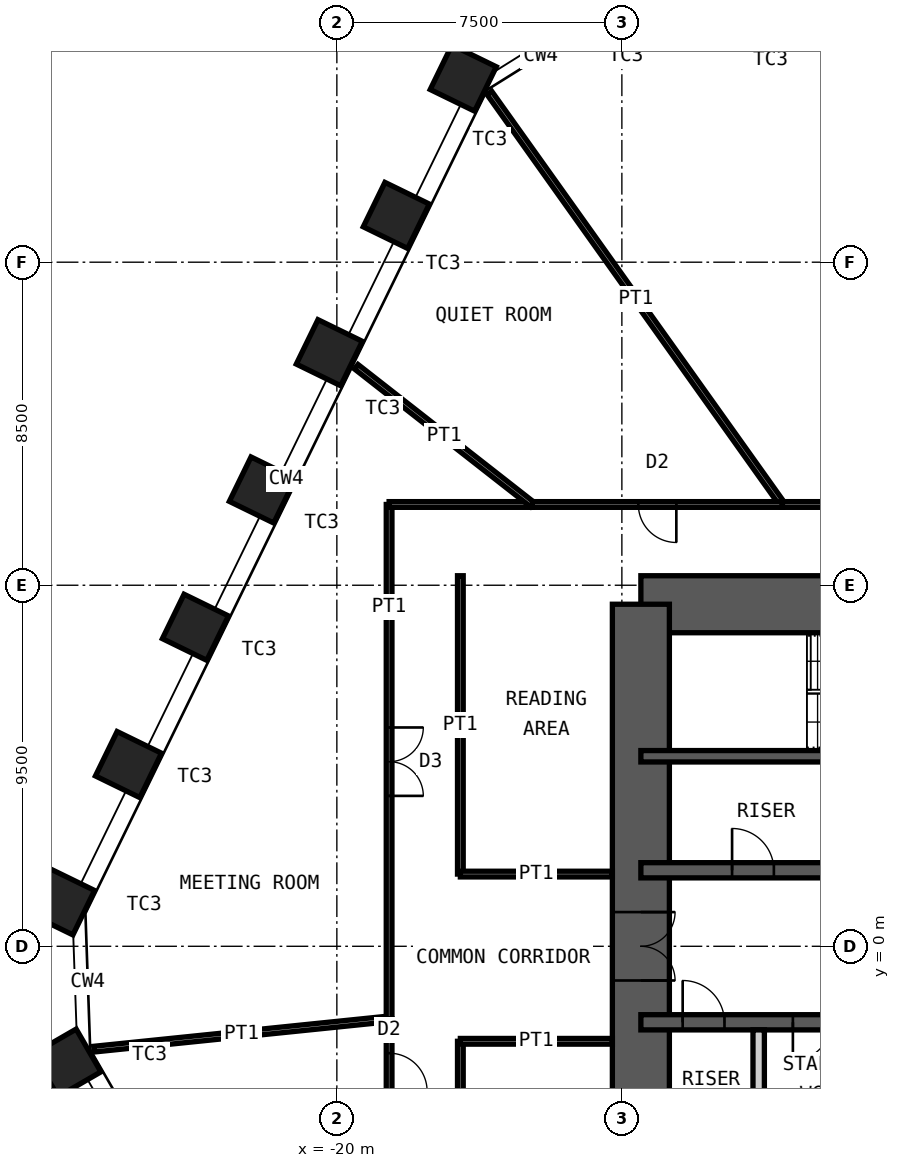
"""IFC4 building model, lengths in metres.
Left out: names, types, materials, properties, quantities, classifications, styles, units other than length and angle.
Written with IfcOpenShell. Run it as: python <this file> out.ifc"""

import sys

from ifc_helpers import new_model, si_unit, direction, frame, frame_2d, origin, origin_2d, place, context, subcontext, project, spatial, rectangle, hollow_rectangle, extrude, element, fill, save


model = new_model("IFC4")
c1 = context("Model", 3, precision=1e-05, world=origin(), true_north=direction((0.0, 1.0)))
c2 = subcontext(c1, "Body", "Model", "MODEL_VIEW")
j1 = project(units=[si_unit("LENGTHUNIT", "METRE"), si_unit("PLANEANGLEUNIT", "RADIAN")], contexts=[c1])
p1 = place(None, origin())
s1 = spatial("IfcSite", under=j1, at=p1, CompositionType="ELEMENT")
p2 = place(p1, origin())
s2 = spatial("IfcBuilding", under=s1, at=p2, CompositionType="ELEMENT")
p3 = place(p2, frame((0.0, 0.0, 119.8)))
s3 = spatial("IfcBuildingStorey", under=s2, at=p3, CompositionType="ELEMENT", Elevation=119.8)
for number, where, z_axis, x_axis in (
    (1, (-27.097, -3.067, 0.0), (0.0, 0.0, 1.0), (0.5, -0.866, 0.0)),
    (2, (-27.245, 1.169, 0.0), (0.0, 0.0, 1.0), (-0.438, -0.899, 0.0)),
    (3, (-25.483, 4.781, 0.0), (0.0, 0.0, 1.0), (-0.438, -0.899, 0.0)),
    (4, (-23.721, 8.394, 0.0), (0.0, 0.0, 1.0), (-0.438, -0.899, 0.0)),
    (5, (-21.959, 12.006, 0.0), (0.0, 0.0, 1.0), (-0.438, -0.899, 0.0)),
    (6, (-20.198, 15.618, 0.0), (0.0, 0.0, 1.0), (-0.438, -0.899, 0.0)),
    (7, (-18.436, 19.23, 0.0), (0.0, 0.0, 1.0), (-0.438, -0.899, 0.0)),
    (8, (-16.674, 22.843, 0.0), (0.0, 0.0, 1.0), (-0.438, -0.899, 0.0)),
):
    element("IfcColumn", number, at=place(p3, frame(where, z_axis=z_axis, x_axis=x_axis)), inside=s3, PredefinedType="COLUMN", context=c2, shape_type="SweptSolid", body=[
        extrude(hollow_rectangle(XDim=1.3, YDim=1.3, WallThickness=0.1, at=origin_2d()), origin(), (0.0, 0.0, 1.0), 4.2),
    ])
p4 = place(p3, frame((-12.0, 9.0, 0.0), z_axis=(0.0, 0.0, 1.0), x_axis=(1.0, 0.0, 0.0)))
e9 = element("IfcWall", 9, at=p4, inside=s3, PredefinedType="SHEAR", context=c2, shape_type="SweptSolid", body=[
    extrude(rectangle(XDim=24.0, YDim=1.5, at=frame_2d((12.0, 0.0))), origin(), (0.0, 0.0, 1.0), 4.2),
])
p5 = place(p4, frame((10.4, 0.0, 0.0)))
e10 = element("IfcOpeningElement", 10, at=p5, cuts=e9, PredefinedType="OPENING", context=c2, shape_type="SweptSolid", body=[
    extrude(rectangle(XDim=1.0, YDim=2.1, at=frame_2d((0.5, 1.05))), frame((0.0, 0.76, 0.0), z_axis=(0.0, -1.0, 0.0), x_axis=(1.0, 0.0, 0.0)), (0.0, 0.0, 1.0), 1.52),
])
p6 = place(p4, frame((17.6, 0.0, 0.0)))
e11 = element("IfcOpeningElement", 11, at=p6, cuts=e9, PredefinedType="OPENING", context=c2, shape_type="SweptSolid", body=[
    extrude(rectangle(XDim=0.9, YDim=2.1, at=frame_2d((0.45, 1.05))), frame((0.0, 0.76, 0.0), z_axis=(0.0, -1.0, 0.0), x_axis=(1.0, 0.0, 0.0)), (0.0, 0.0, 1.0), 1.52),
])
p7 = place(p4, frame((21.9, 0.0, 0.0)))
e12 = element("IfcOpeningElement", 12, at=p7, cuts=e9, PredefinedType="OPENING", context=c2, shape_type="SweptSolid", body=[
    extrude(rectangle(XDim=0.9, YDim=2.1, at=frame_2d((0.45, 1.05))), frame((0.0, 0.76, 0.0), z_axis=(0.0, -1.0, 0.0), x_axis=(1.0, 0.0, 0.0)), (0.0, 0.0, 1.0), 1.52),
])
p8 = place(p3, frame((-12.0, -9.0, 0.0), z_axis=(0.0, 0.0, 1.0), x_axis=(0.0, 1.0, 0.0)))
e13 = element("IfcWall", 13, at=p8, inside=s3, PredefinedType="SHEAR", context=c2, shape_type="SweptSolid", body=[
    extrude(rectangle(XDim=18.0, YDim=1.5, at=frame_2d((9.0, 0.0))), origin(), (0.0, 0.0, 1.0), 4.2),
])
p9 = place(p8, frame((8.1, 0.0, 0.0)))
e14 = element("IfcOpeningElement", 14, at=p9, cuts=e13, PredefinedType="OPENING", context=c2, shape_type="SweptSolid", body=[
    extrude(rectangle(XDim=1.8, YDim=2.1, at=frame_2d((0.9, 1.05))), frame((0.0, 0.76, 0.0), z_axis=(0.0, -1.0, 0.0), x_axis=(1.0, 0.0, 0.0)), (0.0, 0.0, 1.0), 1.52),
])
p10 = place(p3, frame((-12.0, 5.0, 0.0), z_axis=(0.0, 0.0, 1.0), x_axis=(1.0, 0.0, 0.0)))
e15 = element("IfcWall", 15, at=p10, inside=s3, PredefinedType="SHEAR", context=c2, shape_type="SweptSolid", body=[
    extrude(rectangle(XDim=24.0, YDim=0.3, at=frame_2d((12.0, 0.0))), origin(), (0.0, 0.0, 1.0), 4.2),
])
p11 = place(p3, frame((-12.0, 2.0, 0.0), z_axis=(0.0, 0.0, 1.0), x_axis=(1.0, 0.0, 0.0)))
e16 = element("IfcWall", 16, at=p11, inside=s3, PredefinedType="SHEAR", context=c2, shape_type="SweptSolid", body=[
    extrude(rectangle(XDim=24.0, YDim=0.4, at=frame_2d((12.0, 0.0))), origin(), (0.0, 0.0, 1.0), 4.2),
])
p12 = place(p11, frame((2.4, 0.0, 0.0)))
e17 = element("IfcOpeningElement", 17, at=p12, cuts=e16, PredefinedType="OPENING", context=c2, shape_type="SweptSolid", body=[
    extrude(rectangle(XDim=1.1, YDim=2.1, at=frame_2d((0.55, 1.05))), frame((0.0, 0.21, 0.0), z_axis=(0.0, -1.0, 0.0), x_axis=(1.0, 0.0, 0.0)), (0.0, 0.0, 1.0), 0.42),
])
p13 = place(p11, frame((22.0, 0.0, 0.0)))
e18 = element("IfcOpeningElement", 18, at=p13, cuts=e16, PredefinedType="OPENING", context=c2, shape_type="SweptSolid", body=[
    extrude(rectangle(XDim=1.1, YDim=2.1, at=frame_2d((0.55, 1.05))), frame((0.0, 0.21, 0.0), z_axis=(0.0, -1.0, 0.0), x_axis=(1.0, 0.0, 0.0)), (0.0, 0.0, 1.0), 0.42),
])
p14 = place(p11, frame((10.15, 0.0, 0.0)))
e19 = element("IfcOpeningElement", 19, at=p14, cuts=e16, PredefinedType="OPENING", context=c2, shape_type="SweptSolid", body=[
    extrude(rectangle(XDim=1.0, YDim=2.1, at=frame_2d((0.5, 1.05))), frame((0.0, 0.21, 0.0), z_axis=(0.0, -1.0, 0.0), x_axis=(1.0, 0.0, 0.0)), (0.0, 0.0, 1.0), 0.42),
])
p15 = place(p11, frame((6.9, 0.0, 0.0)))
e20 = element("IfcOpeningElement", 20, at=p15, cuts=e16, PredefinedType="OPENING", context=c2, shape_type="SweptSolid", body=[
    extrude(rectangle(XDim=1.0, YDim=2.1, at=frame_2d((0.5, 1.05))), frame((0.0, 0.21, 0.0), z_axis=(0.0, -1.0, 0.0), x_axis=(1.0, 0.0, 0.0)), (0.0, 0.0, 1.0), 0.42),
])
p16 = place(p11, frame((13.35, 0.0, 0.0)))
e21 = element("IfcOpeningElement", 21, at=p16, cuts=e16, PredefinedType="OPENING", context=c2, shape_type="SweptSolid", body=[
    extrude(rectangle(XDim=1.1, YDim=2.4, at=frame_2d((0.55, 1.2))), frame((0.0, 0.21, 0.0), z_axis=(0.0, -1.0, 0.0), x_axis=(1.0, 0.0, 0.0)), (0.0, 0.0, 1.0), 0.42),
])
p17 = place(p11, frame((16.15, 0.0, 0.0)))
e22 = element("IfcOpeningElement", 22, at=p17, cuts=e16, PredefinedType="OPENING", context=c2, shape_type="SweptSolid", body=[
    extrude(rectangle(XDim=1.1, YDim=2.4, at=frame_2d((0.55, 1.2))), frame((0.0, 0.21, 0.0), z_axis=(0.0, -1.0, 0.0), x_axis=(1.0, 0.0, 0.0)), (0.0, 0.0, 1.0), 0.42),
])
p18 = place(p11, frame((18.95, 0.0, 0.0)))
e23 = element("IfcOpeningElement", 23, at=p18, cuts=e16, PredefinedType="OPENING", context=c2, shape_type="SweptSolid", body=[
    extrude(rectangle(XDim=1.1, YDim=2.4, at=frame_2d((0.55, 1.2))), frame((0.0, 0.21, 0.0), z_axis=(0.0, -1.0, 0.0), x_axis=(1.0, 0.0, 0.0)), (0.0, 0.0, 1.0), 0.42),
])
p19 = place(p3, frame((-12.0, -2.0, 0.0), z_axis=(0.0, 0.0, 1.0), x_axis=(1.0, 0.0, 0.0)))
e24 = element("IfcWall", 24, at=p19, inside=s3, PredefinedType="SHEAR", context=c2, shape_type="SweptSolid", body=[
    extrude(rectangle(XDim=24.0, YDim=0.4, at=frame_2d((12.0, 0.0))), origin(), (0.0, 0.0, 1.0), 4.2),
])
p20 = place(p19, frame((1.1, 0.0, 0.0)))
e25 = element("IfcOpeningElement", 25, at=p20, cuts=e24, PredefinedType="OPENING", context=c2, shape_type="SweptSolid", body=[
    extrude(rectangle(XDim=1.1, YDim=2.1, at=frame_2d((0.55, 1.05))), frame((0.0, 0.21, 0.0), z_axis=(0.0, -1.0, 0.0), x_axis=(1.0, 0.0, 0.0)), (0.0, 0.0, 1.0), 0.42),
])
p21 = place(p19, frame((13.55, 0.0, 0.0)))
e26 = element("IfcOpeningElement", 26, at=p21, cuts=e24, PredefinedType="OPENING", context=c2, shape_type="SweptSolid", body=[
    extrude(rectangle(XDim=1.1, YDim=2.1, at=frame_2d((0.55, 1.05))), frame((0.0, 0.21, 0.0), z_axis=(0.0, -1.0, 0.0), x_axis=(1.0, 0.0, 0.0)), (0.0, 0.0, 1.0), 0.42),
])
p22 = place(p19, frame((20.7, 0.0, 0.0)))
e27 = element("IfcOpeningElement", 27, at=p22, cuts=e24, PredefinedType="OPENING", context=c2, shape_type="SweptSolid", body=[
    extrude(rectangle(XDim=1.1, YDim=2.1, at=frame_2d((0.55, 1.05))), frame((0.0, 0.21, 0.0), z_axis=(0.0, -1.0, 0.0), x_axis=(1.0, 0.0, 0.0)), (0.0, 0.0, 1.0), 0.42),
])
p23 = place(p19, frame((4.0, 0.0, 0.0)))
e28 = element("IfcOpeningElement", 28, at=p23, cuts=e24, PredefinedType="OPENING", context=c2, shape_type="SweptSolid", body=[
    extrude(rectangle(XDim=1.0, YDim=2.1, at=frame_2d((0.5, 1.05))), frame((0.0, 0.21, 0.0), z_axis=(0.0, -1.0, 0.0), x_axis=(1.0, 0.0, 0.0)), (0.0, 0.0, 1.0), 0.42),
])
p24 = place(p3, frame((-8.9, -4.85, 0.0), z_axis=(0.0, 0.0, 1.0), x_axis=(0.0, 1.0, 0.0)))
e29 = element("IfcWall", 29, at=p24, inside=s3, PredefinedType="PARTITIONING", context=c2, shape_type="SweptSolid", body=[
    extrude(rectangle(XDim=2.65, YDim=0.3, at=frame_2d((1.325, 0.0))), origin(), (0.0, 0.0, 1.0), 3.98),
])
p25 = place(p3, frame((-15.987, 22.455, 0.0), z_axis=(0.0, 0.0, 1.0), x_axis=(0.579969304452, -0.814638328274, 0.0)))
e30 = element("IfcWall", 30, at=p25, inside=s3, PredefinedType="PARTITIONING", context=c2, shape_type="SweptSolid", body=[
    extrude(rectangle(XDim=13.294, YDim=0.15, at=frame_2d((6.647, 0.0))), origin(), (0.0, 0.0, 1.0), 2.93),
])
p26 = place(p3, frame((-8.277, 11.625, 0.0), z_axis=(0.0, 0.0, 1.0), x_axis=(1.0, 0.0, 0.0)))
e31 = element("IfcWall", 31, at=p26, inside=s3, PredefinedType="PARTITIONING", context=c2, shape_type="SweptSolid", body=[
    extrude(rectangle(XDim=13.488, YDim=0.15, at=frame_2d((6.744, 0.0))), origin(), (0.0, 0.0, 1.0), 4.03),
])
p27 = place(p26, frame((5.844, 0.0, 0.0)))
e32 = element("IfcOpeningElement", 32, at=p27, cuts=e31, PredefinedType="OPENING", context=c2, shape_type="SweptSolid", body=[
    extrude(rectangle(XDim=1.8, YDim=2.4, at=frame_2d((0.9, 1.2))), frame((0.0, 0.085, 0.0), z_axis=(0.0, -1.0, 0.0), x_axis=(1.0, 0.0, 0.0)), (0.0, 0.0, 1.0), 0.17),
])
p28 = place(p3, frame((-18.625, -4.715, 0.0), z_axis=(0.0, 0.0, 1.0), x_axis=(0.0, 1.0, 0.0)))
e33 = element("IfcWall", 33, at=p28, inside=s3, PredefinedType="PARTITIONING", context=c2, shape_type="SweptSolid", body=[
    extrude(rectangle(XDim=2.805, YDim=0.15, at=frame_2d((1.402, 0.0))), origin(), (0.0, 0.0, 1.0), 4.03),
])
p29 = place(p28, frame((0.902, 0.0, 0.0)))
e34 = element("IfcOpeningElement", 34, at=p29, cuts=e33, PredefinedType="OPENING", context=c2, shape_type="SweptSolid", body=[
    extrude(rectangle(XDim=1.0, YDim=2.4, at=frame_2d((0.5, 1.2))), frame((0.0, 0.085, 0.0), z_axis=(0.0, -1.0, 0.0), x_axis=(1.0, 0.0, 0.0)), (0.0, 0.0, 1.0), 0.17),
])
p30 = place(p3, frame((-26.391, -2.706, 0.0), z_axis=(0.0, 0.0, 1.0), x_axis=(0.994783554373, 0.10200823471, 0.0)))
e35 = element("IfcWall", 35, at=p30, inside=s3, PredefinedType="PARTITIONING", context=c2, shape_type="SweptSolid", body=[
    extrude(rectangle(XDim=7.807, YDim=0.15, at=frame_2d((3.904, 0.0))), origin(), (0.0, 0.0, 1.0), 2.93),
])
p31 = place(p3, frame((-18.625, -1.91, 0.0), z_axis=(0.0, 0.0, 1.0), x_axis=(0.0, 1.0, 0.0)))
e36 = element("IfcWall", 36, at=p31, inside=s3, PredefinedType="PARTITIONING", context=c2, shape_type="SweptSolid", body=[
    extrude(rectangle(XDim=13.535, YDim=0.15, at=frame_2d((6.768, 0.0))), origin(), (0.0, 0.0, 1.0), 4.03),
])
p32 = place(p31, frame((5.867, 0.0, 0.0)))
e37 = element("IfcOpeningElement", 37, at=p32, cuts=e36, PredefinedType="OPENING", context=c2, shape_type="SweptSolid", body=[
    extrude(rectangle(XDim=1.8, YDim=2.4, at=frame_2d((0.9, 1.2))), frame((0.0, 0.085, 0.0), z_axis=(0.0, -1.0, 0.0), x_axis=(1.0, 0.0, 0.0)), (0.0, 0.0, 1.0), 0.17),
])
p33 = place(p3, frame((-18.625, 11.625, 0.0), z_axis=(0.0, 0.0, 1.0), x_axis=(1.0, 0.0, 0.0)))
e38 = element("IfcWall", 38, at=p33, inside=s3, PredefinedType="PARTITIONING", context=c2, shape_type="SweptSolid", body=[
    extrude(rectangle(XDim=3.768, YDim=0.15, at=frame_2d((1.884, 0.0))), origin(), (0.0, 0.0, 1.0), 4.03),
])
p34 = place(p3, frame((-19.49, 15.25, 0.0), z_axis=(0.0, 0.0, 1.0), x_axis=(0.787549668605, -0.616251182133, 0.0)))
e39 = element("IfcWall", 39, at=p34, inside=s3, PredefinedType="PARTITIONING", context=c2, shape_type="SweptSolid", body=[
    extrude(rectangle(XDim=5.882, YDim=0.15, at=frame_2d((2.941, 0.0))), origin(), (0.0, 0.0, 1.0), 3.33),
])
p35 = place(p3, frame((-14.857, 11.625, 0.0), z_axis=(0.0, 0.0, 1.0), x_axis=(1.0, 0.0, 0.0)))
e40 = element("IfcWall", 40, at=p35, inside=s3, PredefinedType="PARTITIONING", context=c2, shape_type="SweptSolid", body=[
    extrude(rectangle(XDim=6.581, YDim=0.15, at=frame_2d((3.29, 0.0))), origin(), (0.0, 0.0, 1.0), 4.03),
])
p36 = place(p35, frame((2.79, 0.0, 0.0)))
e41 = element("IfcOpeningElement", 41, at=p36, cuts=e40, PredefinedType="OPENING", context=c2, shape_type="SweptSolid", body=[
    extrude(rectangle(XDim=1.0, YDim=2.4, at=frame_2d((0.5, 1.2))), frame((0.0, 0.085, 0.0), z_axis=(0.0, -1.0, 0.0), x_axis=(1.0, 0.0, 0.0)), (0.0, 0.0, 1.0), 0.17),
])
p37 = place(p3, frame((-16.75, 1.9, 0.0), z_axis=(0.0, 0.0, 1.0), x_axis=(0.0, 1.0, 0.0)))
e42 = element("IfcWall", 42, at=p37, inside=s3, PredefinedType="PARTITIONING", context=c2, shape_type="SweptSolid", body=[
    extrude(rectangle(XDim=7.85, YDim=0.15, at=frame_2d((3.925, 0.0))), origin(), (0.0, 0.0, 1.0), 4.03),
])
p38 = place(p3, frame((-12.75, 1.9, 0.0), z_axis=(0.0, 0.0, 1.0), x_axis=(-1.0, 0.0, 0.0)))
e43 = element("IfcWall", 43, at=p38, inside=s3, PredefinedType="PARTITIONING", context=c2, shape_type="SweptSolid", body=[
    extrude(rectangle(XDim=4.0, YDim=0.15, at=frame_2d((2.0, 0.0))), origin(), (0.0, 0.0, 1.0), 3.33),
])
p39 = place(p3, frame((-16.75, -9.75, 0.0), z_axis=(0.0, 0.0, 1.0), x_axis=(0.0, 1.0, 0.0)))
e44 = element("IfcWall", 44, at=p39, inside=s3, PredefinedType="PARTITIONING", context=c2, shape_type="SweptSolid", body=[
    extrude(rectangle(XDim=7.25, YDim=0.15, at=frame_2d((3.625, 0.0))), origin(), (0.0, 0.0, 1.0), 4.03),
])
p40 = place(p3, frame((-12.75, -2.5, 0.0), z_axis=(0.0, 0.0, 1.0), x_axis=(-1.0, 0.0, 0.0)))
e45 = element("IfcWall", 45, at=p40, inside=s3, PredefinedType="PARTITIONING", context=c2, shape_type="SweptSolid", body=[
    extrude(rectangle(XDim=4.0, YDim=0.15, at=frame_2d((2.0, 0.0))), origin(), (0.0, 0.0, 1.0), 3.33),
])
p41 = place(p12, origin())
e46 = element("IfcDoor", 46, at=p41, inside=s3, OperationType="SINGLE_SWING_RIGHT", PredefinedType="DOOR", context=c2, shape_type="SweptSolid", body=[
    extrude(rectangle(XDim=1.1, YDim=2.1, at=frame_2d((0.55, 1.05))), frame((0.0, 0.025, 0.0), z_axis=(0.0, -1.0, 0.0), x_axis=(1.0, 0.0, 0.0)), (0.0, 0.0, 1.0), 0.05),
])
fill(e17, e46)
p42 = place(p20, origin())
e47 = element("IfcDoor", 47, at=p42, inside=s3, OperationType="SINGLE_SWING_RIGHT", PredefinedType="DOOR", context=c2, shape_type="SweptSolid", body=[
    extrude(rectangle(XDim=1.1, YDim=2.1, at=frame_2d((0.55, 1.05))), frame((0.0, 0.025, 0.0), z_axis=(0.0, -1.0, 0.0), x_axis=(1.0, 0.0, 0.0)), (0.0, 0.0, 1.0), 0.05),
])
fill(e25, e47)
p43 = place(p9, origin())
e48 = element("IfcDoor", 48, at=p43, inside=s3, OperationType="DOUBLE_DOOR_DOUBLE_SWING", PredefinedType="DOOR", context=c2, shape_type="SweptSolid", body=[
    extrude(rectangle(XDim=1.8, YDim=2.1, at=frame_2d((0.9, 1.05))), frame((0.0, 0.025, 0.0), z_axis=(0.0, -1.0, 0.0), x_axis=(1.0, 0.0, 0.0)), (0.0, 0.0, 1.0), 0.05),
])
fill(e14, e48)
p44 = place(p23, origin())
e49 = element("IfcDoor", 49, at=p44, inside=s3, OperationType="SINGLE_SWING_LEFT", PredefinedType="DOOR", context=c2, shape_type="SweptSolid", body=[
    extrude(rectangle(XDim=1.0, YDim=2.1, at=frame_2d((0.5, 1.05))), frame((0.0, 0.025, 0.0), z_axis=(0.0, -1.0, 0.0), x_axis=(1.0, 0.0, 0.0)), (0.0, 0.0, 1.0), 0.05),
])
fill(e28, e49)
p45 = place(p29, origin())
e50 = element("IfcDoor", 50, at=p45, inside=s3, OperationType="SINGLE_SWING_LEFT", PredefinedType="DOOR", context=c2, shape_type="SweptSolid", body=[
    extrude(rectangle(XDim=1.0, YDim=2.4, at=frame_2d((0.5, 1.2))), frame((0.0, 0.025, 0.0), z_axis=(0.0, -1.0, 0.0), x_axis=(1.0, 0.0, 0.0)), (0.0, 0.0, 1.0), 0.05),
])
fill(e34, e50)
p46 = place(p32, origin())
e51 = element("IfcDoor", 51, at=p46, inside=s3, OperationType="DOUBLE_DOOR_DOUBLE_SWING", PredefinedType="DOOR", context=c2, shape_type="SweptSolid", body=[
    extrude(rectangle(XDim=1.8, YDim=2.4, at=frame_2d((0.9, 1.2))), frame((0.0, 0.025, 0.0), z_axis=(0.0, -1.0, 0.0), x_axis=(1.0, 0.0, 0.0)), (0.0, 0.0, 1.0), 0.05),
])
fill(e37, e51)
p47 = place(p36, origin())
e52 = element("IfcDoor", 52, at=p47, inside=s3, OperationType="SINGLE_SWING_RIGHT", PredefinedType="DOOR", context=c2, shape_type="SweptSolid", body=[
    extrude(rectangle(XDim=1.0, YDim=2.4, at=frame_2d((0.5, 1.2))), frame((0.0, 0.025, 0.0), z_axis=(0.0, -1.0, 0.0), x_axis=(1.0, 0.0, 0.0)), (0.0, 0.0, 1.0), 0.05),
])
fill(e41, e52)
save(model, sys.argv[1])
